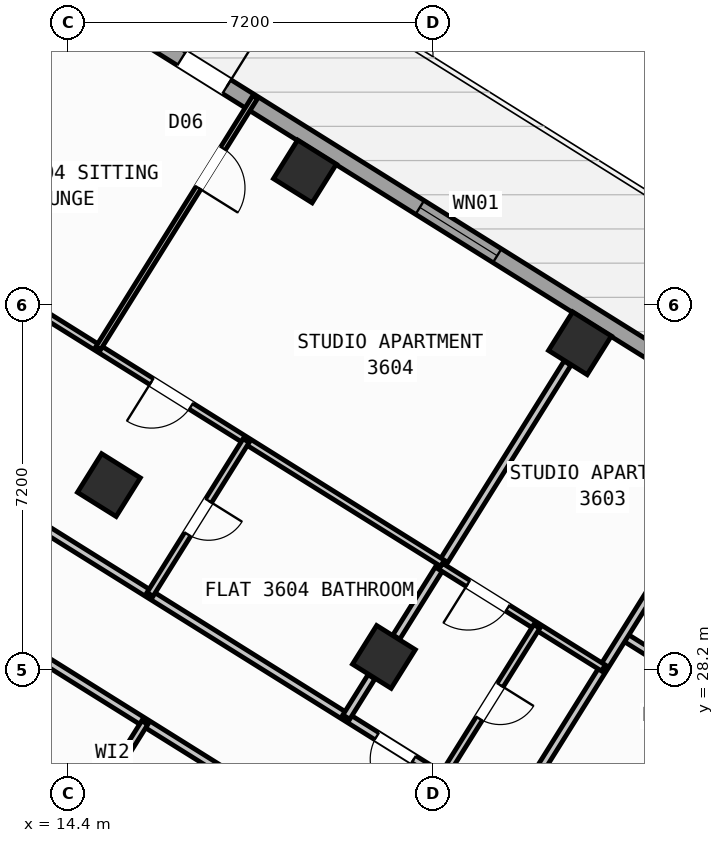
"""IFC4 building model, lengths in metres.
Left out: names, types, materials, properties, quantities, classifications, styles, units other than length and angle.
Written with IfcOpenShell. Run it as: python <this file> out.ifc"""

import sys

from ifc_helpers import new_model, si_unit, direction, frame, frame_2d, origin, origin_2d, place, context, subcontext, project, spatial, rectangle, hollow_rectangle, extrude, source, transform, mapped, element, fill, save


model = new_model("IFC4")
c1 = context("Model", 3, precision=1e-05, world=origin(), true_north=direction((0.0, 1.0)))
c2 = subcontext(c1, "Body", "Model", "MODEL_VIEW")
j1 = project(units=[si_unit("LENGTHUNIT", "METRE"), si_unit("PLANEANGLEUNIT", "RADIAN")], contexts=[c1])
p1 = place(None, origin())
s1 = spatial("IfcSite", under=j1, at=p1, CompositionType="ELEMENT")
p2 = place(p1, origin())
s2 = spatial("IfcBuilding", under=s1, at=p2, CompositionType="ELEMENT")
p3 = place(p2, frame((0.0, 0.0, 144.3)))
s3 = spatial("IfcBuildingStorey", under=s2, at=p3, CompositionType="ELEMENT", Elevation=144.3)
m1 = source(origin(), c2, "Body", "SweptSolid", [
    extrude(hollow_rectangle(XDim=0.9, YDim=0.9, WallThickness=0.036, at=origin_2d()), origin(), (0.0, 0.0, 1.0), 3.6),
])
for number, where, z_axis, x_axis in (
    (1, (24.5, 34.643, 0.0), (0.0, 0.0, 1.0), (-0.848, 0.53, 0.0)),
    (2, (20.632, 28.452, 0.0), (0.0, 0.0, 1.0), (-0.848, 0.53, 0.0)),
    (3, (19.073, 38.034, 0.0), (0.0, 0.0, 1.0), (-0.848, 0.53, 0.0)),
    (4, (15.205, 31.844, 0.0), (0.0, 0.0, 1.0), (-0.848, 0.53, 0.0)),
):
    element("IfcColumn", number, at=place(p3, frame(where, z_axis=z_axis, x_axis=x_axis)), inside=s3, PredefinedType="COLUMN", context=c2, shape_type="MappedRepresentation", body=[
        mapped(m1, transform((0.0, 0.0, 0.0), scale=1.0)),
    ])
p4 = place(p3, frame((14.138, 41.825, 0.0), z_axis=(0.0, 0.0, 1.0), x_axis=(0.848046498049, -0.529921821731, 0.0)))
e5 = element("IfcWall", 5, at=p4, inside=s3, PredefinedType="STANDARD", context=c2, shape_type="SweptSolid", body=[
    extrude(rectangle(XDim=31.588, YDim=0.32, at=frame_2d((15.794, 0.0))), origin(), (0.0, 0.0, 1.0), 3.35),
])
p5 = place(p4, frame((2.949, 0.0, 0.0)))
e6 = element("IfcOpeningElement", 6, at=p5, cuts=e5, PredefinedType="OPENING", context=c2, shape_type="SweptSolid", body=[
    extrude(rectangle(XDim=1.05, YDim=2.15, at=frame_2d((0.525, 1.075))), frame((0.0, 0.17, 0.0), z_axis=(0.0, -1.0, 0.0), x_axis=(1.0, 0.0, 0.0)), (0.0, 0.0, 1.0), 0.34),
])
p6 = place(p4, frame((0.861, 0.0, 0.85)))
e7 = element("IfcOpeningElement", 7, at=p6, cuts=e5, PredefinedType="OPENING", context=c2, shape_type="SweptSolid", body=[
    extrude(rectangle(XDim=1.5, YDim=1.5, at=frame_2d((0.75, 0.75))), frame((0.0, 0.17, 0.0), z_axis=(0.0, -1.0, 0.0), x_axis=(1.0, 0.0, 0.0)), (0.0, 0.0, 1.0), 0.34),
])
p7 = place(p4, frame((8.494, 0.0, 0.85)))
e8 = element("IfcOpeningElement", 8, at=p7, cuts=e5, PredefinedType="OPENING", context=c2, shape_type="SweptSolid", body=[
    extrude(rectangle(XDim=1.8, YDim=1.5, at=frame_2d((0.9, 0.75))), frame((0.0, 0.17, 0.0), z_axis=(0.0, -1.0, 0.0), x_axis=(1.0, 0.0, 0.0)), (0.0, 0.0, 1.0), 0.34),
])
p8 = place(p4, frame((13.874, 0.0, 0.85)))
e9 = element("IfcOpeningElement", 9, at=p8, cuts=e5, PredefinedType="OPENING", context=c2, shape_type="SweptSolid", body=[
    extrude(rectangle(XDim=1.5, YDim=1.5, at=frame_2d((0.75, 0.75))), frame((0.0, 0.17, 0.0), z_axis=(0.0, -1.0, 0.0), x_axis=(1.0, 0.0, 0.0)), (0.0, 0.0, 1.0), 0.34),
])
p9 = place(p4, frame((17.104, 0.0, 1.0)))
e10 = element("IfcOpeningElement", 10, at=p9, cuts=e5, PredefinedType="OPENING", context=c2, shape_type="SweptSolid", body=[
    extrude(rectangle(XDim=0.9, YDim=1.25, at=frame_2d((0.45, 0.625))), frame((0.0, 0.17, 0.0), z_axis=(0.0, -1.0, 0.0), x_axis=(1.0, 0.0, 0.0)), (0.0, 0.0, 1.0), 0.34),
])
p10 = place(p4, frame((22.144, 0.0, 1.0)))
e11 = element("IfcOpeningElement", 11, at=p10, cuts=e5, PredefinedType="OPENING", context=c2, shape_type="SweptSolid", body=[
    extrude(rectangle(XDim=0.9, YDim=1.25, at=frame_2d((0.45, 0.625))), frame((0.0, 0.17, 0.0), z_axis=(0.0, -1.0, 0.0), x_axis=(1.0, 0.0, 0.0)), (0.0, 0.0, 1.0), 0.34),
])
p11 = place(p4, frame((27.744, 0.0, 1.0)))
e12 = element("IfcOpeningElement", 12, at=p11, cuts=e5, PredefinedType="OPENING", context=c2, shape_type="SweptSolid", body=[
    extrude(rectangle(XDim=0.9, YDim=1.25, at=frame_2d((0.45, 0.625))), frame((0.0, 0.17, 0.0), z_axis=(0.0, -1.0, 0.0), x_axis=(1.0, 0.0, 0.0)), (0.0, 0.0, 1.0), 0.34),
])
p12 = place(p3, frame((27.57, 27.478, 0.0), z_axis=(0.0, 0.0, 1.0), x_axis=(-0.848050851465, 0.529914854792, 0.0)))
e13 = element("IfcWall", 13, at=p12, inside=s3, PredefinedType="PARTITIONING", context=c2, shape_type="SweptSolid", body=[
    extrude(rectangle(XDim=2.61, YDim=0.16, at=frame_2d((1.305, 0.0))), origin(), (0.0, 0.0, 1.0), 3.34),
])
p13 = place(p12, frame((0.95, 0.0, 0.0)))
e14 = element("IfcOpeningElement", 14, at=p13, cuts=e13, PredefinedType="OPENING", context=c2, shape_type="SweptSolid", body=[
    extrude(rectangle(XDim=0.86, YDim=2.05, at=frame_2d((0.43, 1.025))), frame((0.0, 0.09, 0.0), z_axis=(0.0, -1.0, 0.0), x_axis=(1.0, 0.0, 0.0)), (0.0, 0.0, 1.0), 0.18),
])
p14 = place(p3, frame((27.953, 33.016, 0.0), z_axis=(0.0, 0.0, 1.0), x_axis=(-0.529903001606, -0.848058257957, 0.0)))
e15 = element("IfcWall", 15, at=p14, inside=s3, PredefinedType="PARTITIONING", context=c2, shape_type="SweptSolid", body=[
    extrude(rectangle(XDim=9.15, YDim=0.16, at=frame_2d((4.575, 0.0))), origin(), (0.0, 0.0, 1.0), 3.34),
])
p15 = place(p3, frame((23.104, 25.256, 0.0), z_axis=(0.0, 0.0, 1.0), x_axis=(-0.848041752158, 0.529929416617, 0.0)))
e16 = element("IfcWall", 16, at=p15, inside=s3, PredefinedType="PARTITIONING", context=c2, shape_type="SweptSolid", body=[
    extrude(rectangle(XDim=16.73, YDim=0.16, at=frame_2d((8.365, 0.0))), origin(), (0.0, 0.0, 1.0), 3.34),
])
p16 = place(p15, frame((2.22, 0.0, 0.0)))
e17 = element("IfcOpeningElement", 17, at=p16, cuts=e16, PredefinedType="OPENING", context=c2, shape_type="SweptSolid", body=[
    extrude(rectangle(XDim=0.86, YDim=2.05, at=frame_2d((0.43, 1.025))), frame((0.0, 0.09, 0.0), z_axis=(0.0, -1.0, 0.0), x_axis=(1.0, 0.0, 0.0)), (0.0, 0.0, 1.0), 0.18),
])
p17 = place(p15, frame((12.084, 0.0, 0.0)))
e18 = element("IfcOpeningElement", 18, at=p17, cuts=e16, PredefinedType="OPENING", context=c2, shape_type="SweptSolid", body=[
    extrude(rectangle(XDim=1.0, YDim=2.1, at=frame_2d((0.5, 1.05))), frame((0.0, 0.09, 0.0), z_axis=(0.0, -1.0, 0.0), x_axis=(1.0, 0.0, 0.0)), (0.0, 0.0, 1.0), 0.18),
])
p18 = place(p3, frame((21.938, 23.391, 0.0), z_axis=(0.0, 0.0, 1.0), x_axis=(-0.848045850158, 0.529922858565, 0.0)))
e19 = element("IfcWall", 19, at=p18, inside=s3, PredefinedType="PARTITIONING", context=c2, shape_type="SweptSolid", body=[
    extrude(rectangle(XDim=16.73, YDim=0.16, at=frame_2d((8.365, 0.0))), origin(), (0.0, 0.0, 1.0), 3.34),
])
p19 = place(p18, frame((2.22, 0.0, 0.0)))
e20 = element("IfcOpeningElement", 20, at=p19, cuts=e19, PredefinedType="OPENING", context=c2, shape_type="SweptSolid", body=[
    extrude(rectangle(XDim=0.86, YDim=2.05, at=frame_2d((0.43, 1.025))), frame((0.0, 0.09, 0.0), z_axis=(0.0, -1.0, 0.0), x_axis=(1.0, 0.0, 0.0)), (0.0, 0.0, 1.0), 0.18),
])
p20 = place(p18, frame((14.22, 0.0, 0.0)))
e21 = element("IfcOpeningElement", 21, at=p20, cuts=e19, PredefinedType="OPENING", context=c2, shape_type="SweptSolid", body=[
    extrude(rectangle(XDim=1.0, YDim=2.1, at=frame_2d((0.5, 1.05))), frame((0.0, 0.09, 0.0), z_axis=(0.0, -1.0, 0.0), x_axis=(1.0, 0.0, 0.0)), (0.0, 0.0, 1.0), 0.18),
])
p21 = place(p3, frame((17.452, 23.364, 0.0), z_axis=(0.0, 0.0, 1.0), x_axis=(-0.848044326704, 0.52992529657, 0.0)))
e22 = element("IfcWall", 22, at=p21, inside=s3, PredefinedType="PLUMBINGWALL", context=c2, shape_type="SweptSolid", body=[
    extrude(rectangle(XDim=8.94, YDim=0.14, at=frame_2d((4.47, 0.0))), origin(), (0.0, 0.0, 1.0), 3.34),
])
p22 = place(p21, frame((5.087, 0.0, 0.0)))
e23 = element("IfcOpeningElement", 23, at=p22, cuts=e22, PredefinedType="OPENING", context=c2, shape_type="SweptSolid", body=[
    extrude(rectangle(XDim=0.78, YDim=2.05, at=frame_2d((0.39, 1.025))), frame((0.0, 0.08, 0.0), z_axis=(0.0, -1.0, 0.0), x_axis=(1.0, 0.0, 0.0)), (0.0, 0.0, 1.0), 0.16),
])
p23 = place(p21, frame((1.218, 0.0, 0.0)))
e24 = element("IfcOpeningElement", 24, at=p23, cuts=e22, PredefinedType="OPENING", context=c2, shape_type="SweptSolid", body=[
    extrude(rectangle(XDim=0.78, YDim=2.05, at=frame_2d((0.39, 1.025))), frame((0.0, 0.08, 0.0), z_axis=(0.0, -1.0, 0.0), x_axis=(1.0, 0.0, 0.0)), (0.0, 0.0, 1.0), 0.16),
])
p24 = place(p3, frame((15.913, 27.156, 0.0), z_axis=(0.0, 0.0, 1.0), x_axis=(-0.529935194983, -0.848038141311, 0.0)))
e25 = element("IfcWall", 25, at=p24, inside=s3, PredefinedType="PLUMBINGWALL", context=c2, shape_type="SweptSolid", body=[
    extrude(rectangle(XDim=2.41, YDim=0.14, at=frame_2d((1.205, 0.0))), origin(), (0.0, 0.0, 1.0), 3.34),
])
p25 = place(p3, frame((16.403, 21.685, 0.0), z_axis=(0.0, 0.0, 1.0), x_axis=(-0.848044326704, 0.52992529657, 0.0)))
e26 = element("IfcWall", 26, at=p25, inside=s3, PredefinedType="PARTITIONING", context=c2, shape_type="SweptSolid", body=[
    extrude(rectangle(XDim=8.94, YDim=0.11, at=frame_2d((4.47, 0.0))), origin(), (0.0, 0.0, 1.0), 3.34),
])
p26 = place(p25, frame((0.657, 0.0, 0.0)))
e27 = element("IfcOpeningElement", 27, at=p26, cuts=e26, PredefinedType="OPENING", context=c2, shape_type="SweptSolid", body=[
    extrude(rectangle(XDim=0.92, YDim=2.08, at=frame_2d((0.46, 1.04))), frame((0.0, 0.065, 0.0), z_axis=(0.0, -1.0, 0.0), x_axis=(1.0, 0.0, 0.0)), (0.0, 0.0, 1.0), 0.13),
])
p27 = place(p25, frame((2.893, 0.0, 0.0)))
e28 = element("IfcOpeningElement", 28, at=p27, cuts=e26, PredefinedType="OPENING", context=c2, shape_type="SweptSolid", body=[
    extrude(rectangle(XDim=0.92, YDim=2.08, at=frame_2d((0.46, 1.04))), frame((0.0, 0.065, 0.0), z_axis=(0.0, -1.0, 0.0), x_axis=(1.0, 0.0, 0.0)), (0.0, 0.0, 1.0), 0.13),
])
p28 = place(p25, frame((5.008, 0.0, 0.0)))
e29 = element("IfcOpeningElement", 29, at=p28, cuts=e26, PredefinedType="OPENING", context=c2, shape_type="SweptSolid", body=[
    extrude(rectangle(XDim=0.92, YDim=2.08, at=frame_2d((0.46, 1.04))), frame((0.0, 0.065, 0.0), z_axis=(0.0, -1.0, 0.0), x_axis=(1.0, 0.0, 0.0)), (0.0, 0.0, 1.0), 0.13),
])
p29 = place(p25, frame((7.363, 0.0, 0.0)))
e30 = element("IfcOpeningElement", 30, at=p29, cuts=e26, PredefinedType="OPENING", context=c2, shape_type="SweptSolid", body=[
    extrude(rectangle(XDim=0.92, YDim=2.08, at=frame_2d((0.46, 1.04))), frame((0.0, 0.065, 0.0), z_axis=(0.0, -1.0, 0.0), x_axis=(1.0, 0.0, 0.0)), (0.0, 0.0, 1.0), 0.13),
])
p30 = place(p3, frame((24.256, 34.251, 0.0), z_axis=(0.0, 0.0, 1.0), x_axis=(-0.529919772691, -0.848047778437, 0.0)))
e31 = element("IfcWall", 31, at=p30, inside=s3, PredefinedType="PARTITIONING", context=c2, shape_type="SweptSolid", body=[
    extrude(rectangle(XDim=6.376, YDim=0.16, at=frame_2d((3.188, 0.0))), origin(), (0.0, 0.0, 1.0), 2.775),
])
p31 = place(p3, frame((20.387, 28.06, 0.0), z_axis=(0.0, 0.0, 1.0), x_axis=(-0.529952145338, -0.848027548876, 0.0)))
e32 = element("IfcWall", 32, at=p31, inside=s3, PredefinedType="PARTITIONING", context=c2, shape_type="SweptSolid", body=[
    extrude(rectangle(XDim=0.938, YDim=0.16, at=frame_2d((0.469, 0.0))), origin(), (0.0, 0.0, 1.0), 2.775),
])
p32 = place(p3, frame((24.964, 28.233, 0.0), z_axis=(0.0, 0.0, 1.0), x_axis=(-0.848059820872, 0.529900500304, 0.0)))
e33 = element("IfcWall", 33, at=p32, inside=s3, PredefinedType="PLUMBINGWALL", context=c2, shape_type="SweptSolid", body=[
    extrude(rectangle(XDim=3.79, YDim=0.14, at=frame_2d((1.895, 0.0))), origin(), (0.0, 0.0, 1.0), 3.34),
])
p33 = place(p32, frame((2.23, 0.0, 0.0)))
e34 = element("IfcOpeningElement", 34, at=p33, cuts=e33, PredefinedType="OPENING", context=c2, shape_type="SweptSolid", body=[
    extrude(rectangle(XDim=0.92, YDim=2.08, at=frame_2d((0.46, 1.04))), frame((0.0, 0.08, 0.0), z_axis=(0.0, -1.0, 0.0), x_axis=(1.0, 0.0, 0.0)), (0.0, 0.0, 1.0), 0.16),
])
p34 = place(p3, frame((23.65, 29.054, 0.0), z_axis=(0.0, 0.0, 1.0), x_axis=(-0.529898896701, -0.848060822863, 0.0)))
e35 = element("IfcWall", 35, at=p34, inside=s3, PredefinedType="PLUMBINGWALL", context=c2, shape_type="SweptSolid", body=[
    extrude(rectangle(XDim=3.51, YDim=0.14, at=frame_2d((1.755, 0.0))), origin(), (0.0, 0.0, 1.0), 2.995),
])
p35 = place(p34, frame((1.365, 0.0, 0.0)))
e36 = element("IfcOpeningElement", 36, at=p35, cuts=e35, PredefinedType="OPENING", context=c2, shape_type="SweptSolid", body=[
    extrude(rectangle(XDim=0.78, YDim=2.05, at=frame_2d((0.39, 1.025))), frame((0.0, 0.08, 0.0), z_axis=(0.0, -1.0, 0.0), x_axis=(1.0, 0.0, 0.0)), (0.0, 0.0, 1.0), 0.16),
])
p36 = place(p3, frame((21.787, 30.301, 0.0), z_axis=(0.0, 0.0, 1.0), x_axis=(-0.848043949058, 0.52992590092, 0.0)))
e37 = element("IfcWall", 37, at=p36, inside=s3, PredefinedType="PLUMBINGWALL", context=c2, shape_type="SweptSolid", body=[
    extrude(rectangle(XDim=12.92, YDim=0.14, at=frame_2d((6.46, 0.0))), origin(), (0.0, 0.0, 1.0), 3.34),
])
p37 = place(p36, frame((5.849, 0.0, 0.0)))
e38 = element("IfcOpeningElement", 38, at=p37, cuts=e37, PredefinedType="OPENING", context=c2, shape_type="SweptSolid", body=[
    extrude(rectangle(XDim=0.92, YDim=2.08, at=frame_2d((0.46, 1.04))), frame((0.0, 0.08, 0.0), z_axis=(0.0, -1.0, 0.0), x_axis=(1.0, 0.0, 0.0)), (0.0, 0.0, 1.0), 0.16),
])
p38 = place(p3, frame((17.913, 32.721, 0.0), z_axis=(0.0, 0.0, 1.0), x_axis=(-0.529906983049, -0.848055770169, 0.0)))
e39 = element("IfcWall", 39, at=p38, inside=s3, PredefinedType="PLUMBINGWALL", context=c2, shape_type="SweptSolid", body=[
    extrude(rectangle(XDim=3.58, YDim=0.14, at=frame_2d((1.79, 0.0))), origin(), (0.0, 0.0, 1.0), 3.34),
])
p39 = place(p38, frame((1.4, 0.0, 0.0)))
e40 = element("IfcOpeningElement", 40, at=p39, cuts=e39, PredefinedType="OPENING", context=c2, shape_type="SweptSolid", body=[
    extrude(rectangle(XDim=0.78, YDim=2.05, at=frame_2d((0.39, 1.025))), frame((0.0, 0.08, 0.0), z_axis=(0.0, -1.0, 0.0), x_axis=(1.0, 0.0, 0.0)), (0.0, 0.0, 1.0), 0.16),
])
p40 = place(p3, frame((18.089, 39.498, 0.0), z_axis=(0.0, 0.0, 1.0), x_axis=(-0.529916267533, -0.848049968695, 0.0)))
e41 = element("IfcWall", 41, at=p40, inside=s3, PredefinedType="PARTITIONING", context=c2, shape_type="SweptSolid", body=[
    extrude(rectangle(XDim=5.84, YDim=0.11, at=frame_2d((2.92, 0.0))), origin(), (0.0, 0.0, 1.0), 3.34),
])
p41 = place(p40, frame((1.19, 0.0, 0.0)))
e42 = element("IfcOpeningElement", 42, at=p41, cuts=e41, PredefinedType="OPENING", context=c2, shape_type="SweptSolid", body=[
    extrude(rectangle(XDim=0.92, YDim=2.08, at=frame_2d((0.46, 1.04))), frame((0.0, 0.065, 0.0), z_axis=(0.0, -1.0, 0.0), x_axis=(1.0, 0.0, 0.0)), (0.0, 0.0, 1.0), 0.13),
])
m2 = source(origin(), c2, "Body", "SweptSolid", [
    extrude(rectangle(XDim=1.05, YDim=2.15, at=frame_2d((0.525, 1.075))), frame((0.0, 0.025, 0.0), z_axis=(0.0, -1.0, 0.0), x_axis=(1.0, 0.0, 0.0)), (0.0, 0.0, 1.0), 0.05),
])
p42 = place(p5, origin())
e43 = element("IfcDoor", 43, at=p42, inside=s3, OperationType="SINGLE_SWING_RIGHT", PredefinedType="DOOR", context=c2, shape_type="MappedRepresentation", body=[
    mapped(m2, transform((0.0, 0.0, 0.0), scale=1.0)),
])
fill(e6, e43)
m3 = source(origin(), c2, "Body", "SweptSolid", [
    extrude(rectangle(XDim=1.8, YDim=1.5, at=frame_2d((0.9, 0.75))), frame((0.0, 0.03, 0.0), z_axis=(0.0, -1.0, 0.0), x_axis=(1.0, 0.0, 0.0)), (0.0, 0.0, 1.0), 0.06),
])
p43 = place(p7, origin())
e44 = element("IfcWindow", 44, at=p43, inside=s3, PartitioningType="SINGLE_PANEL", PredefinedType="WINDOW", context=c2, shape_type="MappedRepresentation", body=[
    mapped(m3, transform((0.0, 0.0, 0.0), scale=1.0)),
])
fill(e8, e44)
m4 = source(origin(), c2, "Body", "SweptSolid", [
    extrude(rectangle(XDim=0.86, YDim=2.05, at=frame_2d((0.43, 1.025))), frame((0.0, 0.025, 0.0), z_axis=(0.0, -1.0, 0.0), x_axis=(1.0, 0.0, 0.0)), (0.0, 0.0, 1.0), 0.05),
])
p44 = place(p16, origin())
e45 = element("IfcDoor", 45, at=p44, inside=s3, OperationType="SINGLE_SWING_LEFT", PredefinedType="DOOR", context=c2, shape_type="MappedRepresentation", body=[
    mapped(m4, transform((0.0, 0.0, 0.0), scale=1.0)),
])
fill(e17, e45)
m5 = source(origin(), c2, "Body", "SweptSolid", [
    extrude(rectangle(XDim=0.92, YDim=2.08, at=frame_2d((0.46, 1.04))), frame((0.0, 0.025, 0.0), z_axis=(0.0, -1.0, 0.0), x_axis=(1.0, 0.0, 0.0)), (0.0, 0.0, 1.0), 0.05),
])
p45 = place(p33, origin())
e46 = element("IfcDoor", 46, at=p45, inside=s3, OperationType="SINGLE_SWING_RIGHT", PredefinedType="DOOR", context=c2, shape_type="MappedRepresentation", body=[
    mapped(m5, transform((0.0, 0.0, 0.0), scale=1.0)),
])
fill(e34, e46)
m6 = source(origin(), c2, "Body", "SweptSolid", [
    extrude(rectangle(XDim=0.78, YDim=2.05, at=frame_2d((0.39, 1.025))), frame((0.0, 0.025, 0.0), z_axis=(0.0, -1.0, 0.0), x_axis=(1.0, 0.0, 0.0)), (0.0, 0.0, 1.0), 0.05),
])
p46 = place(p35, origin())
e47 = element("IfcDoor", 47, at=p46, inside=s3, OperationType="SINGLE_SWING_LEFT", PredefinedType="DOOR", context=c2, shape_type="MappedRepresentation", body=[
    mapped(m6, transform((0.0, 0.0, 0.0), scale=1.0)),
])
fill(e36, e47)
p47 = place(p41, origin())
e48 = element("IfcDoor", 48, at=p47, inside=s3, OperationType="SINGLE_SWING_RIGHT", PredefinedType="DOOR", context=c2, shape_type="MappedRepresentation", body=[
    mapped(m5, transform((0.0, 0.0, 0.0), scale=1.0)),
])
fill(e42, e48)
p48 = place(p37, origin())
e49 = element("IfcDoor", 49, at=p48, inside=s3, OperationType="SINGLE_SWING_RIGHT", PredefinedType="DOOR", context=c2, shape_type="MappedRepresentation", body=[
    mapped(m5, transform((0.0, 0.0, 0.0), scale=1.0)),
])
fill(e38, e49)
p49 = place(p39, origin())
e50 = element("IfcDoor", 50, at=p49, inside=s3, OperationType="SINGLE_SWING_LEFT", PredefinedType="DOOR", context=c2, shape_type="MappedRepresentation", body=[
    mapped(m6, transform((0.0, 0.0, 0.0), scale=1.0)),
])
fill(e40, e50)
save(model, sys.argv[1])
